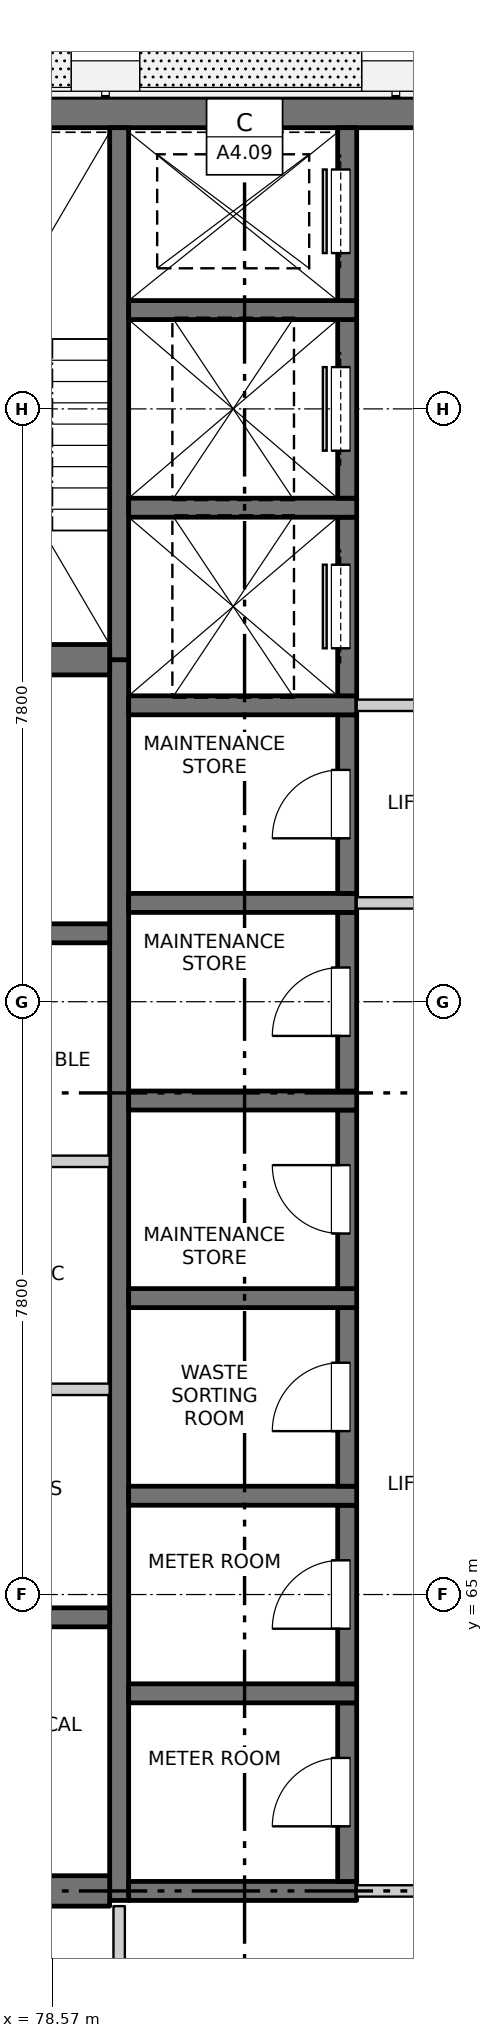
"""IFC4 building model, lengths in metres.
Left out: names, types, materials, properties, quantities, classifications, styles, units other than length and angle.
Written with IfcOpenShell. Run it as: python <this file> out.ifc"""

import sys

from ifc_helpers import new_model, si_unit, direction, frame, frame_2d, origin, place, context, subcontext, project, spatial, rectangle, extrude, element, fill, save


model = new_model("IFC4")
c1 = context("Model", 3, precision=1e-05, world=origin(), true_north=direction((0.0, 1.0)))
c2 = subcontext(c1, "Body", "Model", "MODEL_VIEW")
j1 = project(units=[si_unit("LENGTHUNIT", "METRE"), si_unit("PLANEANGLEUNIT", "RADIAN")], contexts=[c1])
p1 = place(None, origin())
s1 = spatial("IfcSite", under=j1, at=p1, CompositionType="ELEMENT")
p2 = place(p1, origin())
s2 = spatial("IfcBuilding", under=s1, at=p2, CompositionType="ELEMENT")
p3 = place(p2, frame((0.0, 0.0, 256.2)))
s3 = spatial("IfcBuildingStorey", under=s2, at=p3, CompositionType="ELEMENT", Elevation=256.2)
p4 = place(p3, frame((75.45, 84.5, -0.25), z_axis=(0.0, 0.0, 1.0), x_axis=(1.0, 0.0, 0.0)))
e1 = element("IfcWall", 1, at=p4, inside=s3, PredefinedType="SOLIDWALL", context=c2, shape_type="SweptSolid", body=[
    extrude(rectangle(XDim=19.1, YDim=0.4, at=frame_2d((9.55, 0.0))), origin(), (0.0, 0.0, 1.0), 3.4),
])
p5 = place(p3, frame((79.45, 60.975, -0.25), z_axis=(0.0, 0.0, 1.0), x_axis=(0.0, 1.0, 0.0)))
e2 = element("IfcWall", 2, at=p5, inside=s3, PredefinedType="SOLIDWALL", context=c2, shape_type="SweptSolid", body=[
    extrude(rectangle(XDim=16.325, YDim=0.25, at=frame_2d((8.163, 0.0))), origin(), (0.0, 0.0, 1.0), 3.4),
])
p6 = place(p3, frame((79.45, 77.3, -0.25), z_axis=(0.0, 0.0, 1.0), x_axis=(0.0, 1.0, 0.0)))
e3 = element("IfcWall", 3, at=p6, inside=s3, PredefinedType="SOLIDWALL", context=c2, shape_type="SweptSolid", body=[
    extrude(rectangle(XDim=7.0, YDim=0.25, at=frame_2d((3.5, 0.0))), origin(), (0.0, 0.0, 1.0), 3.4),
])
p7 = place(p3, frame((79.575, 61.1, -0.25), z_axis=(0.0, 0.0, 1.0), x_axis=(1.0, 0.0, 0.0)))
e4 = element("IfcWall", 4, at=p7, inside=s3, PredefinedType="SOLIDWALL", context=c2, shape_type="SweptSolid", body=[
    extrude(rectangle(XDim=3.0, YDim=0.25, at=frame_2d((1.5, 0.0))), origin(), (0.0, 0.0, 1.0), 3.4),
])
p8 = place(p3, frame((82.45, 61.225, -0.25), z_axis=(0.0, 0.0, 1.0), x_axis=(0.0, 1.0, 0.0)))
e5 = element("IfcWall", 5, at=p8, inside=s3, PredefinedType="SOLIDWALL", context=c2, shape_type="SweptSolid", body=[
    extrude(rectangle(XDim=2.35, YDim=0.25, at=frame_2d((1.175, 0.0))), origin(), (0.0, 0.0, 1.0), 3.4),
])
p9 = place(p8, frame((0.725, 0.0, 0.25)))
e6 = element("IfcOpeningElement", 6, at=p9, cuts=e5, PredefinedType="OPENING", context=c2, shape_type="SweptSolid", body=[
    extrude(rectangle(XDim=0.9, YDim=2.1, at=frame_2d((0.45, 1.05))), frame((0.0, 0.135, 0.0), z_axis=(0.0, -1.0, 0.0), x_axis=(1.0, 0.0, 0.0)), (0.0, 0.0, 1.0), 0.27),
])
p10 = place(p3, frame((79.575, 63.7, -0.25), z_axis=(0.0, 0.0, 1.0), x_axis=(1.0, 0.0, 0.0)))
e7 = element("IfcWall", 7, at=p10, inside=s3, PredefinedType="SOLIDWALL", context=c2, shape_type="SweptSolid", body=[
    extrude(rectangle(XDim=3.0, YDim=0.25, at=frame_2d((1.5, 0.0))), origin(), (0.0, 0.0, 1.0), 3.4),
])
p11 = place(p3, frame((82.45, 63.825, -0.25), z_axis=(0.0, 0.0, 1.0), x_axis=(0.0, 1.0, 0.0)))
e8 = element("IfcWall", 8, at=p11, inside=s3, PredefinedType="SOLIDWALL", context=c2, shape_type="SweptSolid", body=[
    extrude(rectangle(XDim=2.35, YDim=0.25, at=frame_2d((1.175, 0.0))), origin(), (0.0, 0.0, 1.0), 3.4),
])
p12 = place(p11, frame((0.725, 0.0, 0.25)))
e9 = element("IfcOpeningElement", 9, at=p12, cuts=e8, PredefinedType="OPENING", context=c2, shape_type="SweptSolid", body=[
    extrude(rectangle(XDim=0.9, YDim=2.1, at=frame_2d((0.45, 1.05))), frame((0.0, 0.135, 0.0), z_axis=(0.0, -1.0, 0.0), x_axis=(1.0, 0.0, 0.0)), (0.0, 0.0, 1.0), 0.27),
])
p13 = place(p3, frame((79.575, 66.3, -0.25), z_axis=(0.0, 0.0, 1.0), x_axis=(1.0, 0.0, 0.0)))
e10 = element("IfcWall", 10, at=p13, inside=s3, PredefinedType="SOLIDWALL", context=c2, shape_type="SweptSolid", body=[
    extrude(rectangle(XDim=3.0, YDim=0.25, at=frame_2d((1.5, 0.0))), origin(), (0.0, 0.0, 1.0), 3.4),
])
p14 = place(p3, frame((82.45, 66.425, -0.25), z_axis=(0.0, 0.0, 1.0), x_axis=(0.0, 1.0, 0.0)))
e11 = element("IfcWall", 11, at=p14, inside=s3, PredefinedType="SOLIDWALL", context=c2, shape_type="SweptSolid", body=[
    extrude(rectangle(XDim=2.35, YDim=0.25, at=frame_2d((1.175, 0.0))), origin(), (0.0, 0.0, 1.0), 3.4),
])
p15 = place(p14, frame((0.725, 0.0, 0.25)))
e12 = element("IfcOpeningElement", 12, at=p15, cuts=e11, PredefinedType="OPENING", context=c2, shape_type="SweptSolid", body=[
    extrude(rectangle(XDim=0.9, YDim=2.1, at=frame_2d((0.45, 1.05))), frame((0.0, 0.135, 0.0), z_axis=(0.0, -1.0, 0.0), x_axis=(1.0, 0.0, 0.0)), (0.0, 0.0, 1.0), 0.27),
])
p16 = place(p3, frame((79.575, 68.9, -0.25), z_axis=(0.0, 0.0, 1.0), x_axis=(1.0, 0.0, 0.0)))
e13 = element("IfcWall", 13, at=p16, inside=s3, PredefinedType="SOLIDWALL", context=c2, shape_type="SweptSolid", body=[
    extrude(rectangle(XDim=3.0, YDim=0.25, at=frame_2d((1.5, 0.0))), origin(), (0.0, 0.0, 1.0), 3.4),
])
p17 = place(p3, frame((82.45, 69.025, -0.25), z_axis=(0.0, 0.0, 1.0), x_axis=(0.0, 1.0, 0.0)))
e14 = element("IfcWall", 14, at=p17, inside=s3, PredefinedType="SOLIDWALL", context=c2, shape_type="SweptSolid", body=[
    extrude(rectangle(XDim=2.35, YDim=0.25, at=frame_2d((1.175, 0.0))), origin(), (0.0, 0.0, 1.0), 3.4),
])
p18 = place(p17, frame((0.725, 0.0, 0.25)))
e15 = element("IfcOpeningElement", 15, at=p18, cuts=e14, PredefinedType="OPENING", context=c2, shape_type="SweptSolid", body=[
    extrude(rectangle(XDim=0.9, YDim=2.1, at=frame_2d((0.45, 1.05))), frame((0.0, 0.135, 0.0), z_axis=(0.0, -1.0, 0.0), x_axis=(1.0, 0.0, 0.0)), (0.0, 0.0, 1.0), 0.27),
])
p19 = place(p3, frame((79.575, 71.5, -0.25), z_axis=(0.0, 0.0, 1.0), x_axis=(1.0, 0.0, 0.0)))
e16 = element("IfcWall", 16, at=p19, inside=s3, PredefinedType="SOLIDWALL", context=c2, shape_type="SweptSolid", body=[
    extrude(rectangle(XDim=3.0, YDim=0.25, at=frame_2d((1.5, 0.0))), origin(), (0.0, 0.0, 1.0), 3.4),
])
p20 = place(p3, frame((82.45, 71.625, -0.25), z_axis=(0.0, 0.0, 1.0), x_axis=(0.0, 1.0, 0.0)))
e17 = element("IfcWall", 17, at=p20, inside=s3, PredefinedType="SOLIDWALL", context=c2, shape_type="SweptSolid", body=[
    extrude(rectangle(XDim=2.35, YDim=0.25, at=frame_2d((1.175, 0.0))), origin(), (0.0, 0.0, 1.0), 3.4),
])
p21 = place(p20, frame((0.725, 0.0, 0.25)))
e18 = element("IfcOpeningElement", 18, at=p21, cuts=e17, PredefinedType="OPENING", context=c2, shape_type="SweptSolid", body=[
    extrude(rectangle(XDim=0.9, YDim=2.1, at=frame_2d((0.45, 1.05))), frame((0.0, 0.135, 0.0), z_axis=(0.0, -1.0, 0.0), x_axis=(1.0, 0.0, 0.0)), (0.0, 0.0, 1.0), 0.27),
])
p22 = place(p3, frame((79.575, 74.1, -0.25), z_axis=(0.0, 0.0, 1.0), x_axis=(1.0, 0.0, 0.0)))
e19 = element("IfcWall", 19, at=p22, inside=s3, PredefinedType="SOLIDWALL", context=c2, shape_type="SweptSolid", body=[
    extrude(rectangle(XDim=3.0, YDim=0.25, at=frame_2d((1.5, 0.0))), origin(), (0.0, 0.0, 1.0), 3.4),
])
p23 = place(p3, frame((82.45, 74.225, -0.25), z_axis=(0.0, 0.0, 1.0), x_axis=(0.0, 1.0, 0.0)))
e20 = element("IfcWall", 20, at=p23, inside=s3, PredefinedType="SOLIDWALL", context=c2, shape_type="SweptSolid", body=[
    extrude(rectangle(XDim=2.35, YDim=0.25, at=frame_2d((1.175, 0.0))), origin(), (0.0, 0.0, 1.0), 3.4),
])
p24 = place(p23, frame((0.725, 0.0, 0.25)))
e21 = element("IfcOpeningElement", 21, at=p24, cuts=e20, PredefinedType="OPENING", context=c2, shape_type="SweptSolid", body=[
    extrude(rectangle(XDim=0.9, YDim=2.1, at=frame_2d((0.45, 1.05))), frame((0.0, 0.135, 0.0), z_axis=(0.0, -1.0, 0.0), x_axis=(1.0, 0.0, 0.0)), (0.0, 0.0, 1.0), 0.27),
])
p25 = place(p3, frame((79.575, 76.7, -0.25), z_axis=(0.0, 0.0, 1.0), x_axis=(1.0, 0.0, 0.0)))
e22 = element("IfcWall", 22, at=p25, inside=s3, PredefinedType="SOLIDWALL", context=c2, shape_type="SweptSolid", body=[
    extrude(rectangle(XDim=3.0, YDim=0.25, at=frame_2d((1.5, 0.0))), origin(), (0.0, 0.0, 1.0), 3.4),
])
p26 = place(p3, frame((82.45, 76.825, -0.25), z_axis=(0.0, 0.0, 1.0), x_axis=(0.0, 1.0, 0.0)))
e23 = element("IfcWall", 23, at=p26, inside=s3, PredefinedType="SOLIDWALL", context=c2, shape_type="SweptSolid", body=[
    extrude(rectangle(XDim=2.35, YDim=0.25, at=frame_2d((1.175, 0.0))), origin(), (0.0, 0.0, 1.0), 3.4),
])
p27 = place(p26, frame((0.625, 0.0, 0.25)))
e24 = element("IfcOpeningElement", 24, at=p27, cuts=e23, PredefinedType="OPENING", context=c2, shape_type="SweptSolid", body=[
    extrude(rectangle(XDim=1.1, YDim=2.1, at=frame_2d((0.55, 1.05))), frame((0.0, 0.135, 0.0), z_axis=(0.0, -1.0, 0.0), x_axis=(1.0, 0.0, 0.0)), (0.0, 0.0, 1.0), 0.27),
])
p28 = place(p3, frame((79.575, 79.3, -0.25), z_axis=(0.0, 0.0, 1.0), x_axis=(1.0, 0.0, 0.0)))
e25 = element("IfcWall", 25, at=p28, inside=s3, PredefinedType="SOLIDWALL", context=c2, shape_type="SweptSolid", body=[
    extrude(rectangle(XDim=3.0, YDim=0.25, at=frame_2d((1.5, 0.0))), origin(), (0.0, 0.0, 1.0), 3.4),
])
p29 = place(p3, frame((82.45, 79.425, -0.25), z_axis=(0.0, 0.0, 1.0), x_axis=(0.0, 1.0, 0.0)))
e26 = element("IfcWall", 26, at=p29, inside=s3, PredefinedType="SOLIDWALL", context=c2, shape_type="SweptSolid", body=[
    extrude(rectangle(XDim=2.35, YDim=0.25, at=frame_2d((1.175, 0.0))), origin(), (0.0, 0.0, 1.0), 3.4),
])
p30 = place(p29, frame((0.625, 0.0, 0.25)))
e27 = element("IfcOpeningElement", 27, at=p30, cuts=e26, PredefinedType="OPENING", context=c2, shape_type="SweptSolid", body=[
    extrude(rectangle(XDim=1.1, YDim=2.1, at=frame_2d((0.55, 1.05))), frame((0.0, 0.135, 0.0), z_axis=(0.0, -1.0, 0.0), x_axis=(1.0, 0.0, 0.0)), (0.0, 0.0, 1.0), 0.27),
])
p31 = place(p3, frame((79.575, 81.9, -0.25), z_axis=(0.0, 0.0, 1.0), x_axis=(1.0, 0.0, 0.0)))
e28 = element("IfcWall", 28, at=p31, inside=s3, PredefinedType="SOLIDWALL", context=c2, shape_type="SweptSolid", body=[
    extrude(rectangle(XDim=3.0, YDim=0.25, at=frame_2d((1.5, 0.0))), origin(), (0.0, 0.0, 1.0), 3.4),
])
p32 = place(p3, frame((82.45, 82.025, -0.25), z_axis=(0.0, 0.0, 1.0), x_axis=(0.0, 1.0, 0.0)))
e29 = element("IfcWall", 29, at=p32, inside=s3, PredefinedType="SOLIDWALL", context=c2, shape_type="SweptSolid", body=[
    extrude(rectangle(XDim=2.275, YDim=0.25, at=frame_2d((1.138, 0.0))), origin(), (0.0, 0.0, 1.0), 3.4),
])
p33 = place(p32, frame((0.625, 0.0, 0.25)))
e30 = element("IfcOpeningElement", 30, at=p33, cuts=e29, PredefinedType="OPENING", context=c2, shape_type="SweptSolid", body=[
    extrude(rectangle(XDim=1.1, YDim=2.1, at=frame_2d((0.55, 1.05))), frame((0.0, 0.135, 0.0), z_axis=(0.0, -1.0, 0.0), x_axis=(1.0, 0.0, 0.0)), (0.0, 0.0, 1.0), 0.27),
])
p34 = place(p3, frame((75.45, 61.1, -0.25), z_axis=(0.0, 0.0, 1.0), x_axis=(1.0, 0.0, 0.0)))
e31 = element("IfcWall", 31, at=p34, inside=s3, PredefinedType="SOLIDWALL", context=c2, shape_type="SweptSolid", body=[
    extrude(rectangle(XDim=3.875, YDim=0.4, at=frame_2d((1.938, 0.0))), origin(), (0.0, 0.0, 1.0), 3.4),
])
for number, where, z_axis, x_axis in (
    (32, (75.45, 64.7, -0.25), (0.0, 0.0, 1.0), (1.0, 0.0, 0.0)),
    (33, (75.45, 73.7, -0.25), (0.0, 0.0, 1.0), (1.0, 0.0, 0.0)),
):
    element("IfcWall", number, at=place(p3, frame(where, z_axis=z_axis, x_axis=x_axis)), inside=s3, PredefinedType="SOLIDWALL", context=c2, shape_type="SweptSolid", body=[
        extrude(rectangle(XDim=3.875, YDim=0.25, at=frame_2d((1.938, 0.0))), origin(), (0.0, 0.0, 1.0), 3.4),
    ])
p35 = place(p3, frame((75.45, 77.3, -0.25), z_axis=(0.0, 0.0, 1.0), x_axis=(1.0, 0.0, 0.0)))
e34 = element("IfcWall", 34, at=p35, inside=s3, PredefinedType="SOLIDWALL", context=c2, shape_type="SweptSolid", body=[
    extrude(rectangle(XDim=3.875, YDim=0.4, at=frame_2d((1.938, 0.0))), origin(), (0.0, 0.0, 1.0), 3.4),
])
p36 = place(p3, frame((82.575, 61.1, 0.0), z_axis=(0.0, 0.0, 1.0), x_axis=(1.0, 0.0, 0.0)))
e35 = element("IfcWall", 35, at=p36, inside=s3, PredefinedType="PARTITIONING", context=c2, shape_type="SweptSolid", body=[
    extrude(rectangle(XDim=4.85, YDim=0.15, at=frame_2d((2.425, 0.0))), origin(), (0.0, 0.0, 1.0), 3.15),
])
p37 = place(p36, frame((1.525, 0.0, 0.0)))
e36 = element("IfcOpeningElement", 36, at=p37, cuts=e35, PredefinedType="OPENING", context=c2, shape_type="SweptSolid", body=[
    extrude(rectangle(XDim=1.8, YDim=2.1, at=frame_2d((0.9, 1.05))), frame((0.0, 0.085, 0.0), z_axis=(0.0, -1.0, 0.0), x_axis=(1.0, 0.0, 0.0)), (0.0, 0.0, 1.0), 0.17),
])
for number, where, z_axis, x_axis in (
    (37, (75.45, 67.7, 0.0), (0.0, 0.0, 1.0), (1.0, 0.0, 0.0)),
    (38, (75.45, 70.7, 0.0), (0.0, 0.0, 1.0), (1.0, 0.0, 0.0)),
):
    element("IfcWall", number, at=place(p3, frame(where, z_axis=z_axis, x_axis=x_axis)), inside=s3, PredefinedType="PARTITIONING", context=c2, shape_type="SweptSolid", body=[
        extrude(rectangle(XDim=3.875, YDim=0.15, at=frame_2d((1.938, 0.0))), origin(), (0.0, 0.0, 1.0), 3.15),
    ])
p38 = place(p3, frame((82.575, 74.1, 0.0), z_axis=(0.0, 0.0, 1.0), x_axis=(1.0, 0.0, 0.0)))
e39 = element("IfcWall", 39, at=p38, inside=s3, PredefinedType="PARTITIONING", context=c2, shape_type="SweptSolid", body=[
    extrude(rectangle(XDim=4.85, YDim=0.15, at=frame_2d((2.425, 0.0))), origin(), (0.0, 0.0, 1.0), 3.15),
])
p39 = place(p38, frame((1.525, 0.0, 0.0)))
e40 = element("IfcOpeningElement", 40, at=p39, cuts=e39, PredefinedType="OPENING", context=c2, shape_type="SweptSolid", body=[
    extrude(rectangle(XDim=1.8, YDim=2.1, at=frame_2d((0.9, 1.05))), frame((0.0, 0.085, 0.0), z_axis=(0.0, -1.0, 0.0), x_axis=(1.0, 0.0, 0.0)), (0.0, 0.0, 1.0), 0.17),
])
p40 = place(p3, frame((82.575, 76.7, 0.0), z_axis=(0.0, 0.0, 1.0), x_axis=(1.0, 0.0, 0.0)))
e41 = element("IfcWall", 41, at=p40, inside=s3, PredefinedType="PARTITIONING", context=c2, shape_type="SweptSolid", body=[
    extrude(rectangle(XDim=4.85, YDim=0.15, at=frame_2d((2.425, 0.0))), origin(), (0.0, 0.0, 1.0), 3.15),
])
p41 = place(p40, frame((1.525, 0.0, 0.0)))
e42 = element("IfcOpeningElement", 42, at=p41, cuts=e41, PredefinedType="OPENING", context=c2, shape_type="SweptSolid", body=[
    extrude(rectangle(XDim=1.8, YDim=2.1, at=frame_2d((0.9, 1.05))), frame((0.0, 0.085, 0.0), z_axis=(0.0, -1.0, 0.0), x_axis=(1.0, 0.0, 0.0)), (0.0, 0.0, 1.0), 0.17),
])
p42 = place(p3, frame((79.45, 55.45, 0.0), z_axis=(0.0, 0.0, 1.0), x_axis=(0.0, 1.0, 0.0)))
e43 = element("IfcWall", 43, at=p42, inside=s3, PredefinedType="PARTITIONING", context=c2, shape_type="SweptSolid", body=[
    extrude(rectangle(XDim=5.45, YDim=0.15, at=frame_2d((2.725, 0.0))), origin(), (0.0, 0.0, 1.0), 3.15),
])
p43 = place(p42, frame((2.25, 0.0, 0.0)))
e44 = element("IfcOpeningElement", 44, at=p43, cuts=e43, PredefinedType="OPENING", context=c2, shape_type="SweptSolid", body=[
    extrude(rectangle(XDim=0.9, YDim=2.1, at=frame_2d((0.45, 1.05))), frame((0.0, 0.085, 0.0), z_axis=(0.0, -1.0, 0.0), x_axis=(1.0, 0.0, 0.0)), (0.0, 0.0, 1.0), 0.17),
])
p44 = place(p9, origin())
e45 = element("IfcDoor", 45, at=p44, inside=s3, OperationType="SINGLE_SWING_LEFT", PredefinedType="DOOR", context=c2, shape_type="SweptSolid", body=[
    extrude(rectangle(XDim=0.9, YDim=2.1, at=frame_2d((0.45, 1.05))), frame((0.0, 0.11, 0.0), z_axis=(0.0, -1.0, 0.0), x_axis=(1.0, 0.0, 0.0)), (0.0, 0.0, 1.0), 0.05),
])
fill(e6, e45)
p45 = place(p12, origin())
e46 = element("IfcDoor", 46, at=p45, inside=s3, OperationType="SINGLE_SWING_LEFT", PredefinedType="DOOR", context=c2, shape_type="SweptSolid", body=[
    extrude(rectangle(XDim=0.9, YDim=2.1, at=frame_2d((0.45, 1.05))), frame((0.0, 0.11, 0.0), z_axis=(0.0, -1.0, 0.0), x_axis=(1.0, 0.0, 0.0)), (0.0, 0.0, 1.0), 0.05),
])
fill(e9, e46)
p46 = place(p15, origin())
e47 = element("IfcDoor", 47, at=p46, inside=s3, OperationType="SINGLE_SWING_LEFT", PredefinedType="DOOR", context=c2, shape_type="SweptSolid", body=[
    extrude(rectangle(XDim=0.9, YDim=2.1, at=frame_2d((0.45, 1.05))), frame((0.0, 0.11, 0.0), z_axis=(0.0, -1.0, 0.0), x_axis=(1.0, 0.0, 0.0)), (0.0, 0.0, 1.0), 0.05),
])
fill(e12, e47)
p47 = place(p18, origin())
e48 = element("IfcDoor", 48, at=p47, inside=s3, OperationType="SINGLE_SWING_RIGHT", PredefinedType="DOOR", context=c2, shape_type="SweptSolid", body=[
    extrude(rectangle(XDim=0.9, YDim=2.1, at=frame_2d((0.45, 1.05))), frame((0.0, 0.11, 0.0), z_axis=(0.0, -1.0, 0.0), x_axis=(1.0, 0.0, 0.0)), (0.0, 0.0, 1.0), 0.05),
])
fill(e15, e48)
p48 = place(p21, origin())
e49 = element("IfcDoor", 49, at=p48, inside=s3, OperationType="SINGLE_SWING_LEFT", PredefinedType="DOOR", context=c2, shape_type="SweptSolid", body=[
    extrude(rectangle(XDim=0.9, YDim=2.1, at=frame_2d((0.45, 1.05))), frame((0.0, 0.11, 0.0), z_axis=(0.0, -1.0, 0.0), x_axis=(1.0, 0.0, 0.0)), (0.0, 0.0, 1.0), 0.05),
])
fill(e18, e49)
p49 = place(p24, origin())
e50 = element("IfcDoor", 50, at=p49, inside=s3, OperationType="SINGLE_SWING_LEFT", PredefinedType="DOOR", context=c2, shape_type="SweptSolid", body=[
    extrude(rectangle(XDim=0.9, YDim=2.1, at=frame_2d((0.45, 1.05))), frame((0.0, 0.11, 0.0), z_axis=(0.0, -1.0, 0.0), x_axis=(1.0, 0.0, 0.0)), (0.0, 0.0, 1.0), 0.05),
])
fill(e21, e50)
p50 = place(p27, origin())
e51 = element("IfcDoor", 51, at=p50, inside=s3, OperationType="SLIDING_TO_LEFT", PredefinedType="DOOR", context=c2, shape_type="SweptSolid", body=[
    extrude(rectangle(XDim=1.1, YDim=2.1, at=frame_2d((0.55, 1.05))), frame((0.0, 0.11, 0.0), z_axis=(0.0, -1.0, 0.0), x_axis=(1.0, 0.0, 0.0)), (0.0, 0.0, 1.0), 0.05),
])
fill(e24, e51)
p51 = place(p30, origin())
e52 = element("IfcDoor", 52, at=p51, inside=s3, OperationType="SLIDING_TO_LEFT", PredefinedType="DOOR", context=c2, shape_type="SweptSolid", body=[
    extrude(rectangle(XDim=1.1, YDim=2.1, at=frame_2d((0.55, 1.05))), frame((0.0, 0.11, 0.0), z_axis=(0.0, -1.0, 0.0), x_axis=(1.0, 0.0, 0.0)), (0.0, 0.0, 1.0), 0.05),
])
fill(e27, e52)
p52 = place(p33, origin())
e53 = element("IfcDoor", 53, at=p52, inside=s3, OperationType="SLIDING_TO_RIGHT", PredefinedType="DOOR", context=c2, shape_type="SweptSolid", body=[
    extrude(rectangle(XDim=1.1, YDim=2.1, at=frame_2d((0.55, 1.05))), frame((0.0, 0.11, 0.0), z_axis=(0.0, -1.0, 0.0), x_axis=(1.0, 0.0, 0.0)), (0.0, 0.0, 1.0), 0.05),
])
fill(e30, e53)
save(model, sys.argv[1])
